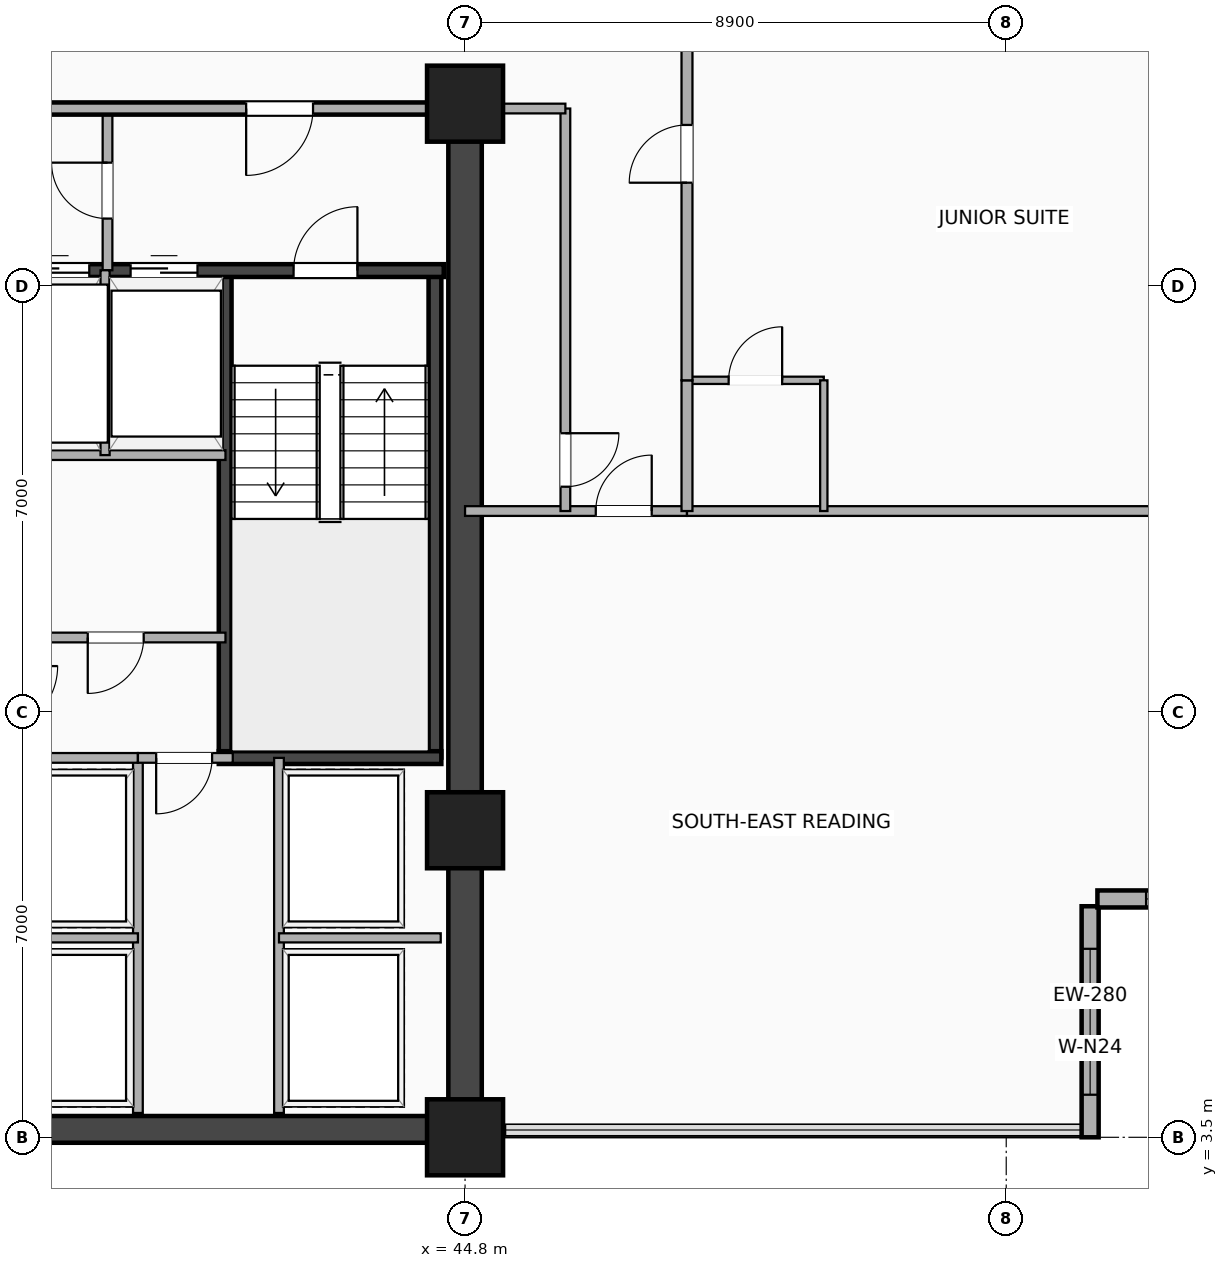
"""IFC4 building model, lengths in metres.
Left out: names, types, materials, properties, quantities, classifications, styles, units other than length and angle.
Written with IfcOpenShell. Run it as: python <this file> out.ifc"""

import sys

from ifc_helpers import new_model, si_unit, direction, frame, frame_2d, origin, origin_2d, place, context, subcontext, project, spatial, rectangle, extrude, element, fill, save


model = new_model("IFC4")
c1 = context("Model", 3, precision=1e-05, world=origin(), true_north=direction((0.0, 1.0)))
c2 = subcontext(c1, "Body", "Model", "MODEL_VIEW")
j1 = project(units=[si_unit("LENGTHUNIT", "METRE"), si_unit("PLANEANGLEUNIT", "RADIAN")], contexts=[c1])
p1 = place(None, origin())
s1 = spatial("IfcSite", under=j1, at=p1, CompositionType="ELEMENT")
p2 = place(p1, origin())
s2 = spatial("IfcBuilding", under=s1, at=p2, CompositionType="ELEMENT")
p3 = place(p2, frame((0.0, 0.0, 98.7)))
s3 = spatial("IfcBuildingStorey", under=s2, at=p3, CompositionType="ELEMENT", Elevation=98.7)
p4 = place(p3, frame((20.3, 3.63, 0.0), z_axis=(0.0, 0.0, 1.0), x_axis=(1.0, 0.0, 0.0)))
e1 = element("IfcWall", 1, at=p4, inside=s3, PredefinedType="SHEAR", context=c2, shape_type="SweptSolid", body=[
    extrude(rectangle(XDim=24.5, YDim=0.44, at=frame_2d((12.25, 0.0))), origin(), (0.0, 0.0, 1.0), 3.24),
])
p5 = place(p3, frame((44.8, 3.5, 0.0), z_axis=(0.0, 0.0, 1.0), x_axis=(0.0, 1.0, 0.0)))
e2 = element("IfcWall", 2, at=p5, inside=s3, PredefinedType="SHEAR", context=c2, shape_type="SweptSolid", body=[
    extrude(rectangle(XDim=16.9, YDim=0.55, at=frame_2d((8.45, 0.0))), origin(), (0.0, 0.0, 1.0), 3.24),
])
for number, where, z_axis, x_axis in (
    (3, (40.855, 9.745, 0.0), (0.0, 0.0, 1.0), (0.0, 1.0, 0.0)),
    (4, (44.305, 9.745, 0.0), (0.0, 0.0, 1.0), (0.0, 1.0, 0.0)),
):
    element("IfcWall", number, at=place(p3, frame(where, z_axis=z_axis, x_axis=x_axis)), inside=s3, PredefinedType="SHEAR", context=c2, shape_type="SweptSolid", body=[
        extrude(rectangle(XDim=8.01, YDim=0.21, at=frame_2d((4.005, 0.0))), origin(), (0.0, 0.0, 1.0), 3.24),
    ])
p6 = place(p3, frame((40.75, 9.745, 0.0), z_axis=(0.0, 0.0, 1.0), x_axis=(1.0, 0.0, 0.0)))
e5 = element("IfcWall", 5, at=p6, inside=s3, PredefinedType="SHEAR", context=c2, shape_type="SweptSolid", body=[
    extrude(rectangle(XDim=3.66, YDim=0.21, at=frame_2d((1.83, 0.0))), origin(), (0.0, 0.0, 1.0), 3.24),
])
p7 = place(p3, frame((37.25, 17.755, 0.0), z_axis=(0.0, 0.0, 1.0), x_axis=(1.0, 0.0, 0.0)))
e6 = element("IfcWall", 6, at=p7, inside=s3, PredefinedType="SHEAR", context=c2, shape_type="SweptSolid", body=[
    extrude(rectangle(XDim=7.2, YDim=0.21, at=frame_2d((3.6, 0.0))), origin(), (0.0, 0.0, 1.0), 3.24),
])
p8 = place(p7, frame((0.25, 0.0, 0.0)))
e7 = element("IfcOpeningElement", 7, at=p8, cuts=e6, PredefinedType="OPENING", context=c2, shape_type="SweptSolid", body=[
    extrude(rectangle(XDim=1.12, YDim=2.2, at=frame_2d((0.56, 1.1))), frame((0.0, 0.115, 0.0), z_axis=(0.0, -1.0, 0.0), x_axis=(1.0, 0.0, 0.0)), (0.0, 0.0, 1.0), 0.23),
])
p9 = place(p7, frame((2.05, 0.0, 0.0)))
e8 = element("IfcOpeningElement", 8, at=p9, cuts=e6, PredefinedType="OPENING", context=c2, shape_type="SweptSolid", body=[
    extrude(rectangle(XDim=1.1, YDim=2.18, at=frame_2d((0.55, 1.09))), frame((0.0, 0.115, 0.0), z_axis=(0.0, -1.0, 0.0), x_axis=(1.0, 0.0, 0.0)), (0.0, 0.0, 1.0), 0.23),
])
p10 = place(p7, frame((5.78, 0.0, 0.0), z_axis=(0.0, 0.0, 1.0), x_axis=(-1.0, 0.0, 0.0)))
e9 = element("IfcOpeningElement", 9, at=p10, cuts=e6, PredefinedType="OPENING", context=c2, shape_type="SweptSolid", body=[
    extrude(rectangle(XDim=1.05, YDim=2.15, at=frame_2d((0.525, 1.075))), frame((0.0, 0.115, 0.0), z_axis=(0.0, -1.0, 0.0), x_axis=(1.0, 0.0, 0.0)), (0.0, 0.0, 1.0), 0.23),
])
for number, where, z_axis, x_axis in (
    (10, (44.8, 3.5, -0.26), (0.0, 0.0, 1.0), (1.0, 0.0, 0.0)),
    (11, (44.8, 8.55, -0.26), (0.0, 0.0, 1.0), (1.0, 0.0, 0.0)),
    (12, (44.8, 20.5, -0.26), (0.0, 0.0, 1.0), (1.0, 0.0, 0.0)),
):
    element("IfcColumn", number, at=place(p3, frame(where, z_axis=z_axis, x_axis=x_axis)), inside=s3, PredefinedType="COLUMN", context=c2, shape_type="SweptSolid", body=[
        extrude(rectangle(XDim=1.25, YDim=1.25, at=origin_2d()), origin(), (0.0, 0.0, 1.0), 3.5),
    ])
p11 = place(p3, frame((55.08, 3.5, 0.0), z_axis=(0.0, 0.0, 1.0), x_axis=(0.0, 1.0, 0.0)))
e13 = element("IfcWall", 13, at=p11, inside=s3, PredefinedType="SOLIDWALL", context=c2, shape_type="SweptSolid", body=[
    extrude(rectangle(XDim=3.8, YDim=0.28, at=frame_2d((1.9, 0.0))), origin(), (0.0, 0.0, 1.0), 3.24),
])
p12 = place(p11, frame((0.7, 0.0, 0.85)))
e14 = element("IfcOpeningElement", 14, at=p12, cuts=e13, PredefinedType="OPENING", context=c2, shape_type="SweptSolid", body=[
    extrude(rectangle(XDim=2.4, YDim=1.65, at=frame_2d((1.2, 0.825))), frame((0.0, 0.15, 0.0), z_axis=(0.0, -1.0, 0.0), x_axis=(1.0, 0.0, 0.0)), (0.0, 0.0, 1.0), 0.3),
])
p13 = place(p3, frame((55.2, 7.42, 0.0), z_axis=(0.0, 0.0, 1.0), x_axis=(1.0, 0.0, 0.0)))
e15 = element("IfcWall", 15, at=p13, inside=s3, PredefinedType="SOLIDWALL", context=c2, shape_type="SweptSolid", body=[
    extrude(rectangle(XDim=3.8, YDim=0.28, at=frame_2d((1.9, 0.0))), origin(), (0.0, 0.0, 1.0), 3.24),
])
p14 = place(p13, frame((0.8, 0.0, 0.85)))
e16 = element("IfcOpeningElement", 16, at=p14, cuts=e15, PredefinedType="OPENING", context=c2, shape_type="SweptSolid", body=[
    extrude(rectangle(XDim=2.2, YDim=1.65, at=frame_2d((1.1, 0.825))), frame((0.0, 0.15, 0.0), z_axis=(0.0, -1.0, 0.0), x_axis=(1.0, 0.0, 0.0)), (0.0, 0.0, 1.0), 0.3),
])
p15 = place(p3, frame((38.92, 17.76, 0.0), z_axis=(0.0, 0.0, 1.0), x_axis=(0.0, 1.0, 0.0)))
e17 = element("IfcWall", 17, at=p15, inside=s3, PredefinedType="PARTITIONING", context=c2, shape_type="SweptSolid", body=[
    extrude(rectangle(XDim=2.66, YDim=0.16, at=frame_2d((1.33, 0.0))), origin(), (0.0, 0.0, 1.0), 2.614),
])
p16 = place(p15, frame((1.77, 0.0, 0.0), z_axis=(0.0, 0.0, 1.0), x_axis=(-1.0, 0.0, 0.0)))
e18 = element("IfcOpeningElement", 18, at=p16, cuts=e17, PredefinedType="OPENING", context=c2, shape_type="SweptSolid", body=[
    extrude(rectangle(XDim=0.92, YDim=2.08, at=frame_2d((0.46, 1.04))), frame((0.0, 0.09, 0.0), z_axis=(0.0, -1.0, 0.0), x_axis=(1.0, 0.0, 0.0)), (0.0, 0.0, 1.0), 0.18),
])
p17 = place(p3, frame((37.25, 14.72, 0.0), z_axis=(0.0, 0.0, 1.0), x_axis=(1.0, 0.0, 0.0)))
e19 = element("IfcWall", 19, at=p17, inside=s3, PredefinedType="PARTITIONING", context=c2, shape_type="SweptSolid", body=[
    extrude(rectangle(XDim=3.61, YDim=0.16, at=frame_2d((1.805, 0.0))), origin(), (0.0, 0.0, 1.0), 3.24),
])
p18 = place(p3, frame((38.88, 14.72, 0.0), z_axis=(0.0, 0.0, 1.0), x_axis=(0.0, 1.0, 0.0)))
e20 = element("IfcWall", 20, at=p18, inside=s3, PredefinedType="PARTITIONING", context=c2, shape_type="SweptSolid", body=[
    extrude(rectangle(XDim=3.04, YDim=0.15, at=frame_2d((1.52, 0.0))), origin(), (0.0, 0.0, 1.0), 3.24),
])
p19 = place(p3, frame((37.0, 20.42, 0.0), z_axis=(0.0, 0.0, 1.0), x_axis=(1.0, 0.0, 0.0)))
e21 = element("IfcWall", 21, at=p19, inside=s3, PredefinedType="PARTITIONING", context=c2, shape_type="SweptSolid", body=[
    extrude(rectangle(XDim=7.45, YDim=0.2, at=frame_2d((3.725, 0.0))), origin(), (0.0, 0.0, 1.0), 2.313),
])
p20 = place(p19, frame((4.2, 0.0, 0.0)))
e22 = element("IfcOpeningElement", 22, at=p20, cuts=e21, PredefinedType="OPENING", context=c2, shape_type="SweptSolid", body=[
    extrude(rectangle(XDim=1.1, YDim=2.15, at=frame_2d((0.55, 1.075))), frame((0.0, 0.11, 0.0), z_axis=(0.0, -1.0, 0.0), x_axis=(1.0, 0.0, 0.0)), (0.0, 0.0, 1.0), 0.22),
])
p21 = place(p3, frame((37.25, 11.72, 0.0), z_axis=(0.0, 0.0, 1.0), x_axis=(1.0, 0.0, 0.0)))
e23 = element("IfcWall", 23, at=p21, inside=s3, PredefinedType="PARTITIONING", context=c2, shape_type="SweptSolid", body=[
    extrude(rectangle(XDim=3.61, YDim=0.16, at=frame_2d((1.805, 0.0))), origin(), (0.0, 0.0, 1.0), 3.24),
])
p22 = place(p21, frame((1.345, 0.0, 0.0)))
e24 = element("IfcOpeningElement", 24, at=p22, cuts=e23, PredefinedType="OPENING", context=c2, shape_type="SweptSolid", body=[
    extrude(rectangle(XDim=0.92, YDim=2.08, at=frame_2d((0.46, 1.04))), frame((0.0, 0.09, 0.0), z_axis=(0.0, -1.0, 0.0), x_axis=(1.0, 0.0, 0.0)), (0.0, 0.0, 1.0), 0.18),
])
for number, where, z_axis, x_axis in (
    (25, (39.42, 3.9, 0.0), (0.0, 0.0, 1.0), (0.0, 1.0, 0.0)),
    (26, (41.74, 3.9, 0.0), (0.0, 0.0, 1.0), (0.0, 1.0, 0.0)),
):
    element("IfcWall", number, at=place(p3, frame(where, z_axis=z_axis, x_axis=x_axis)), inside=s3, PredefinedType="PARTITIONING", context=c2, shape_type="SweptSolid", body=[
        extrude(rectangle(XDim=5.84, YDim=0.16, at=frame_2d((2.92, 0.0))), origin(), (0.0, 0.0, 1.0), 3.24),
    ])
p23 = place(p3, frame((37.25, 6.78, 0.0), z_axis=(0.0, 0.0, 1.0), x_axis=(1.0, 0.0, 0.0)))
e27 = element("IfcWall", 27, at=p23, inside=s3, PredefinedType="PARTITIONING", context=c2, shape_type="SweptSolid", body=[
    extrude(rectangle(XDim=2.17, YDim=0.15, at=frame_2d((1.085, 0.0))), origin(), (0.0, 0.0, 1.0), 3.24),
])
p24 = place(p3, frame((41.74, 6.78, 0.0), z_axis=(0.0, 0.0, 1.0), x_axis=(1.0, 0.0, 0.0)))
e28 = element("IfcWall", 28, at=p24, inside=s3, PredefinedType="PARTITIONING", context=c2, shape_type="SweptSolid", body=[
    extrude(rectangle(XDim=2.66, YDim=0.15, at=frame_2d((1.33, 0.0))), origin(), (0.0, 0.0, 1.0), 2.313),
])
p25 = place(p3, frame((37.25, 9.74, 0.0), z_axis=(0.0, 0.0, 1.0), x_axis=(1.0, 0.0, 0.0)))
e29 = element("IfcWall", 29, at=p25, inside=s3, PredefinedType="PARTITIONING", context=c2, shape_type="SweptSolid", body=[
    extrude(rectangle(XDim=2.17, YDim=0.16, at=frame_2d((1.085, 0.0))), origin(), (0.0, 0.0, 1.0), 3.24),
])
p26 = place(p3, frame((39.42, 9.74, 0.0), z_axis=(0.0, 0.0, 1.0), x_axis=(1.0, 0.0, 0.0)))
e30 = element("IfcWall", 30, at=p26, inside=s3, PredefinedType="PARTITIONING", context=c2, shape_type="SweptSolid", body=[
    extrude(rectangle(XDim=1.56, YDim=0.16, at=frame_2d((0.78, 0.0))), origin(), (0.0, 0.0, 1.0), 3.24),
])
p27 = place(p26, frame((0.3, 0.0, 0.0)))
e31 = element("IfcOpeningElement", 31, at=p27, cuts=e30, PredefinedType="OPENING", context=c2, shape_type="SweptSolid", body=[
    extrude(rectangle(XDim=0.92, YDim=2.08, at=frame_2d((0.46, 1.04))), frame((0.0, 0.09, 0.0), z_axis=(0.0, -1.0, 0.0), x_axis=(1.0, 0.0, 0.0)), (0.0, 0.0, 1.0), 0.18),
])
p28 = place(p3, frame((44.8, 13.8, 0.0), z_axis=(0.0, 0.0, 1.0), x_axis=(1.0, 0.0, 0.0)))
e32 = element("IfcWall", 32, at=p28, inside=s3, PredefinedType="PARTITIONING", context=c2, shape_type="SweptSolid", body=[
    extrude(rectangle(XDim=3.65, YDim=0.16, at=frame_2d((1.825, 0.0))), origin(), (0.0, 0.0, 1.0), 2.313),
])
p29 = place(p28, frame((3.07, 0.0, 0.0), z_axis=(0.0, 0.0, 1.0), x_axis=(-1.0, 0.0, 0.0)))
e33 = element("IfcOpeningElement", 33, at=p29, cuts=e32, PredefinedType="OPENING", context=c2, shape_type="SweptSolid", body=[
    extrude(rectangle(XDim=0.92, YDim=2.08, at=frame_2d((0.46, 1.04))), frame((0.0, 0.09, 0.0), z_axis=(0.0, -1.0, 0.0), x_axis=(1.0, 0.0, 0.0)), (0.0, 0.0, 1.0), 0.18),
])
p30 = place(p3, frame((46.45, 13.8, 0.0), z_axis=(0.0, 0.0, 1.0), x_axis=(0.0, 1.0, 0.0)))
e34 = element("IfcWall", 34, at=p30, inside=s3, PredefinedType="PARTITIONING", context=c2, shape_type="SweptSolid", body=[
    extrude(rectangle(XDim=6.62, YDim=0.16, at=frame_2d((3.31, 0.0))), origin(), (0.0, 0.0, 1.0), 2.313),
])
p31 = place(p30, frame((0.4, 0.0, 0.0)))
e35 = element("IfcOpeningElement", 35, at=p31, cuts=e34, PredefinedType="OPENING", context=c2, shape_type="SweptSolid", body=[
    extrude(rectangle(XDim=0.88, YDim=2.08, at=frame_2d((0.44, 1.04))), frame((0.0, 0.09, 0.0), z_axis=(0.0, -1.0, 0.0), x_axis=(1.0, 0.0, 0.0)), (0.0, 0.0, 1.0), 0.18),
])
p32 = place(p3, frame((44.8, 20.42, 0.0), z_axis=(0.0, 0.0, 1.0), x_axis=(1.0, 0.0, 0.0)))
e36 = element("IfcWall", 36, at=p32, inside=s3, PredefinedType="PARTITIONING", context=c2, shape_type="SweptSolid", body=[
    extrude(rectangle(XDim=1.65, YDim=0.16, at=frame_2d((0.825, 0.0))), origin(), (0.0, 0.0, 1.0), 2.313),
])
p33 = place(p3, frame((48.45, 13.8, 0.0), z_axis=(0.0, 0.0, 1.0), x_axis=(1.0, 0.0, 0.0)))
e37 = element("IfcWall", 37, at=p33, inside=s3, PredefinedType="PARTITIONING", context=c2, shape_type="SweptSolid", body=[
    extrude(rectangle(XDim=10.43, YDim=0.16, at=frame_2d((5.215, 0.0))), origin(), (0.0, 0.0, 1.0), 2.603),
])
p34 = place(p3, frame((48.45, 15.95, 0.0), z_axis=(0.0, 0.0, 1.0), x_axis=(1.0, 0.0, 0.0)))
e38 = element("IfcWall", 38, at=p34, inside=s3, PredefinedType="PARTITIONING", context=c2, shape_type="SweptSolid", body=[
    extrude(rectangle(XDim=2.25, YDim=0.12, at=frame_2d((1.125, 0.0))), origin(), (0.0, 0.0, 1.0), 3.24),
])
p35 = place(p34, frame((1.565, 0.0, 0.0), z_axis=(0.0, 0.0, 1.0), x_axis=(-1.0, 0.0, 0.0)))
e39 = element("IfcOpeningElement", 39, at=p35, cuts=e38, PredefinedType="OPENING", context=c2, shape_type="SweptSolid", body=[
    extrude(rectangle(XDim=0.88, YDim=2.08, at=frame_2d((0.44, 1.04))), frame((0.0, 0.07, 0.0), z_axis=(0.0, -1.0, 0.0), x_axis=(1.0, 0.0, 0.0)), (0.0, 0.0, 1.0), 0.14),
])
p36 = place(p3, frame((50.7, 13.8, 0.0), z_axis=(0.0, 0.0, 1.0), x_axis=(0.0, 1.0, 0.0)))
e40 = element("IfcWall", 40, at=p36, inside=s3, PredefinedType="PARTITIONING", context=c2, shape_type="SweptSolid", body=[
    extrude(rectangle(XDim=2.15, YDim=0.12, at=frame_2d((1.075, 0.0))), origin(), (0.0, 0.0, 1.0), 2.922),
])
p37 = place(p3, frame((48.45, 13.8, 0.0), z_axis=(0.0, 0.0, 1.0), x_axis=(0.0, 1.0, 0.0)))
e41 = element("IfcWall", 41, at=p37, inside=s3, PredefinedType="PARTITIONING", context=c2, shape_type="SweptSolid", body=[
    extrude(rectangle(XDim=2.15, YDim=0.18, at=frame_2d((1.075, 0.0))), origin(), (0.0, 0.0, 1.0), 2.922),
])
p38 = place(p3, frame((48.45, 15.95, 0.0), z_axis=(0.0, 0.0, 1.0), x_axis=(0.0, 1.0, 0.0)))
e42 = element("IfcWall", 42, at=p38, inside=s3, PredefinedType="PARTITIONING", context=c2, shape_type="SweptSolid", body=[
    extrude(rectangle(XDim=7.45, YDim=0.18, at=frame_2d((3.725, 0.0))), origin(), (0.0, 0.0, 1.0), 2.313),
])
p39 = place(p38, frame((4.2, 0.0, 0.0), z_axis=(0.0, 0.0, 1.0), x_axis=(-1.0, 0.0, 0.0)))
e43 = element("IfcOpeningElement", 43, at=p39, cuts=e42, PredefinedType="OPENING", context=c2, shape_type="SweptSolid", body=[
    extrude(rectangle(XDim=0.95, YDim=2.15, at=frame_2d((0.475, 1.075))), frame((0.0, 0.1, 0.0), z_axis=(0.0, -1.0, 0.0), x_axis=(1.0, 0.0, 0.0)), (0.0, 0.0, 1.0), 0.2),
])
p40 = place(p12, origin())
e44 = element("IfcWindow", 44, at=p40, inside=s3, PartitioningType="SINGLE_PANEL", PredefinedType="WINDOW", context=c2, shape_type="SweptSolid", body=[
    extrude(rectangle(XDim=2.4, YDim=1.65, at=frame_2d((1.2, 0.825))), frame((0.0, 0.03, 0.0), z_axis=(0.0, -1.0, 0.0), x_axis=(1.0, 0.0, 0.0)), (0.0, 0.0, 1.0), 0.06),
])
fill(e14, e44)
p41 = place(p14, origin())
e45 = element("IfcWindow", 45, at=p41, inside=s3, PartitioningType="SINGLE_PANEL", PredefinedType="WINDOW", context=c2, shape_type="SweptSolid", body=[
    extrude(rectangle(XDim=2.2, YDim=1.65, at=frame_2d((1.1, 0.825))), frame((0.0, 0.03, 0.0), z_axis=(0.0, -1.0, 0.0), x_axis=(1.0, 0.0, 0.0)), (0.0, 0.0, 1.0), 0.06),
])
fill(e16, e45)
p42 = place(p8, origin())
e46 = element("IfcDoor", 46, at=p42, inside=s3, OperationType="DOUBLE_DOOR_SLIDING", PredefinedType="DOOR", context=c2, shape_type="SweptSolid", body=[
    extrude(rectangle(XDim=1.12, YDim=2.2, at=frame_2d((0.56, 1.1))), frame((0.0, 0.025, 0.0), z_axis=(0.0, -1.0, 0.0), x_axis=(1.0, 0.0, 0.0)), (0.0, 0.0, 1.0), 0.05),
])
fill(e7, e46)
p43 = place(p9, origin())
e47 = element("IfcDoor", 47, at=p43, inside=s3, OperationType="DOUBLE_DOOR_SLIDING", PredefinedType="DOOR", context=c2, shape_type="SweptSolid", body=[
    extrude(rectangle(XDim=1.1, YDim=2.18, at=frame_2d((0.55, 1.09))), frame((0.0, 0.025, 0.0), z_axis=(0.0, -1.0, 0.0), x_axis=(1.0, 0.0, 0.0)), (0.0, 0.0, 1.0), 0.05),
])
fill(e8, e47)
p44 = place(p10, origin())
e48 = element("IfcDoor", 48, at=p44, inside=s3, OperationType="SINGLE_SWING_RIGHT", PredefinedType="DOOR", context=c2, shape_type="SweptSolid", body=[
    extrude(rectangle(XDim=1.05, YDim=2.15, at=frame_2d((0.525, 1.075))), frame((0.0, 0.025, 0.0), z_axis=(0.0, -1.0, 0.0), x_axis=(1.0, 0.0, 0.0)), (0.0, 0.0, 1.0), 0.05),
])
fill(e9, e48)
p45 = place(p16, origin())
e49 = element("IfcDoor", 49, at=p45, inside=s3, OperationType="SINGLE_SWING_RIGHT", PredefinedType="DOOR", context=c2, shape_type="SweptSolid", body=[
    extrude(rectangle(XDim=0.92, YDim=2.08, at=frame_2d((0.46, 1.04))), frame((0.0, 0.025, 0.0), z_axis=(0.0, -1.0, 0.0), x_axis=(1.0, 0.0, 0.0)), (0.0, 0.0, 1.0), 0.05),
])
fill(e18, e49)
p46 = place(p20, origin())
e50 = element("IfcDoor", 50, at=p46, inside=s3, OperationType="SINGLE_SWING_LEFT", PredefinedType="DOOR", context=c2, shape_type="SweptSolid", body=[
    extrude(rectangle(XDim=1.1, YDim=2.15, at=frame_2d((0.55, 1.075))), frame((0.0, 0.025, 0.0), z_axis=(0.0, -1.0, 0.0), x_axis=(1.0, 0.0, 0.0)), (0.0, 0.0, 1.0), 0.05),
])
fill(e22, e50)
p47 = place(p22, origin())
e51 = element("IfcDoor", 51, at=p47, inside=s3, OperationType="SINGLE_SWING_LEFT", PredefinedType="DOOR", context=c2, shape_type="SweptSolid", body=[
    extrude(rectangle(XDim=0.92, YDim=2.08, at=frame_2d((0.46, 1.04))), frame((0.0, 0.025, 0.0), z_axis=(0.0, -1.0, 0.0), x_axis=(1.0, 0.0, 0.0)), (0.0, 0.0, 1.0), 0.05),
])
fill(e24, e51)
p48 = place(p27, origin())
e52 = element("IfcDoor", 52, at=p48, inside=s3, OperationType="SINGLE_SWING_LEFT", PredefinedType="DOOR", context=c2, shape_type="SweptSolid", body=[
    extrude(rectangle(XDim=0.92, YDim=2.08, at=frame_2d((0.46, 1.04))), frame((0.0, 0.025, 0.0), z_axis=(0.0, -1.0, 0.0), x_axis=(1.0, 0.0, 0.0)), (0.0, 0.0, 1.0), 0.05),
])
fill(e31, e52)
p49 = place(p29, origin())
e53 = element("IfcDoor", 53, at=p49, inside=s3, OperationType="SINGLE_SWING_RIGHT", PredefinedType="DOOR", context=c2, shape_type="SweptSolid", body=[
    extrude(rectangle(XDim=0.92, YDim=2.08, at=frame_2d((0.46, 1.04))), frame((0.0, 0.025, 0.0), z_axis=(0.0, -1.0, 0.0), x_axis=(1.0, 0.0, 0.0)), (0.0, 0.0, 1.0), 0.05),
])
fill(e33, e53)
p50 = place(p31, origin())
e54 = element("IfcDoor", 54, at=p50, inside=s3, OperationType="SINGLE_SWING_RIGHT", PredefinedType="DOOR", context=c2, shape_type="SweptSolid", body=[
    extrude(rectangle(XDim=0.88, YDim=2.08, at=frame_2d((0.44, 1.04))), frame((0.0, 0.025, 0.0), z_axis=(0.0, -1.0, 0.0), x_axis=(1.0, 0.0, 0.0)), (0.0, 0.0, 1.0), 0.05),
])
fill(e35, e54)
p51 = place(p35, origin())
e55 = element("IfcDoor", 55, at=p51, inside=s3, OperationType="SINGLE_SWING_RIGHT", PredefinedType="DOOR", context=c2, shape_type="SweptSolid", body=[
    extrude(rectangle(XDim=0.88, YDim=2.08, at=frame_2d((0.44, 1.04))), frame((0.0, 0.025, 0.0), z_axis=(0.0, -1.0, 0.0), x_axis=(1.0, 0.0, 0.0)), (0.0, 0.0, 1.0), 0.05),
])
fill(e39, e55)
p52 = place(p39, origin())
e56 = element("IfcDoor", 56, at=p52, inside=s3, OperationType="SINGLE_SWING_LEFT", PredefinedType="DOOR", context=c2, shape_type="SweptSolid", body=[
    extrude(rectangle(XDim=0.95, YDim=2.15, at=frame_2d((0.475, 1.075))), frame((0.0, 0.025, 0.0), z_axis=(0.0, -1.0, 0.0), x_axis=(1.0, 0.0, 0.0)), (0.0, 0.0, 1.0), 0.05),
])
fill(e43, e56)
save(model, sys.argv[1])
